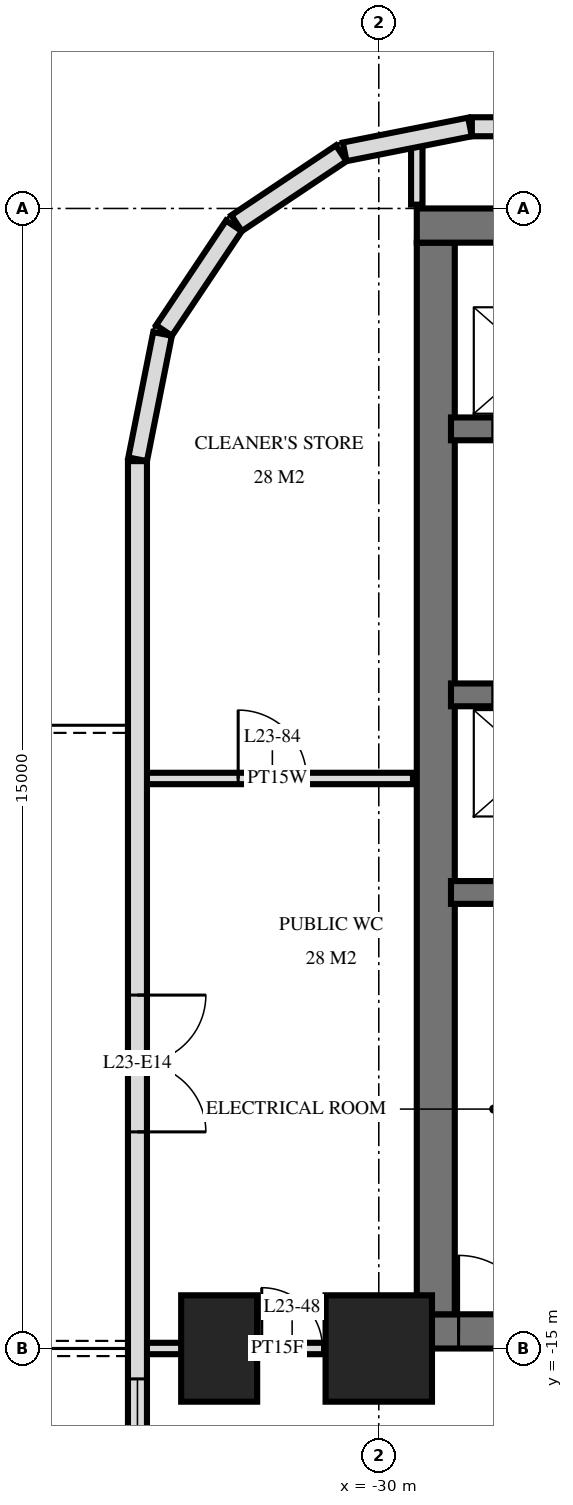
"""IFC4 building model, lengths in metres.
Left out: names, types, materials, properties, quantities, classifications, styles, units other than length and angle.
Written with IfcOpenShell. Run it as: python <this file> out.ifc"""

import sys

from ifc_helpers import new_model, si_unit, direction, frame, frame_2d, origin, origin_2d, place, context, subcontext, project, spatial, rectangle, extrude, element, fill, save


model = new_model("IFC4")
c1 = context("Model", 3, precision=1e-05, world=origin(), true_north=direction((0.0, 1.0)))
c2 = subcontext(c1, "Body", "Model", "MODEL_VIEW")
j1 = project(units=[si_unit("LENGTHUNIT", "METRE"), si_unit("PLANEANGLEUNIT", "RADIAN")], contexts=[c1])
p1 = place(None, origin())
s1 = spatial("IfcSite", under=j1, at=p1, CompositionType="ELEMENT")
p2 = place(p1, origin())
s2 = spatial("IfcBuilding", under=s1, at=p2, CompositionType="ELEMENT")
p3 = place(p2, frame((0.0, 0.0, 92.4)))
s3 = spatial("IfcBuildingStorey", under=s2, at=p3, CompositionType="ELEMENT", Elevation=92.4)
p4 = place(p3, frame((-32.1, -15.0, 0.0), z_axis=(0.0, 0.0, 1.0), x_axis=(0.0, 1.0, 0.0)))
e1 = element("IfcColumn", 1, at=p4, inside=s3, PredefinedType="COLUMN", context=c2, shape_type="SweptSolid", body=[
    extrude(rectangle(XDim=1.4, YDim=1.0, at=origin_2d()), origin(), (0.0, 0.0, 1.0), 3.6),
])
p5 = place(p3, frame((-30.0, -15.0, 0.0), z_axis=(0.0, 0.0, 1.0), x_axis=(1.0, 0.0, 0.0)))
e2 = element("IfcColumn", 2, at=p5, inside=s3, PredefinedType="COLUMN", context=c2, shape_type="SweptSolid", body=[
    extrude(rectangle(XDim=1.4, YDim=1.4, at=origin_2d()), origin(), (0.0, 0.0, 1.0), 3.6),
])
p6 = place(p3, frame((-29.5, -0.225, 0.0), z_axis=(0.0, 0.0, 1.0), x_axis=(1.0, 0.0, 0.0)))
e3 = element("IfcWall", 3, at=p6, inside=s3, PredefinedType="SHEAR", context=c2, shape_type="SweptSolid", body=[
    extrude(rectangle(XDim=19.5, YDim=0.45, at=frame_2d((9.75, 0.0))), origin(), (0.0, 0.0, 1.0), 3.6),
])
p7 = place(p3, frame((-29.5, -14.775, 0.0), z_axis=(0.0, 0.0, 1.0), x_axis=(1.0, 0.0, 0.0)))
e4 = element("IfcWall", 4, at=p7, inside=s3, PredefinedType="SHEAR", context=c2, shape_type="SweptSolid", body=[
    extrude(rectangle(XDim=19.5, YDim=0.45, at=frame_2d((9.75, 0.0))), origin(), (0.0, 0.0, 1.0), 3.6),
])
p8 = place(p7, frame((11.2, 0.0, 0.0)))
e5 = element("IfcOpeningElement", 5, at=p8, cuts=e4, PredefinedType="OPENING", context=c2, shape_type="SweptSolid", body=[
    extrude(rectangle(XDim=1.2, YDim=2.1, at=frame_2d((0.6, 1.05))), frame((0.0, 0.235, 0.0), z_axis=(0.0, -1.0, 0.0), x_axis=(1.0, 0.0, 0.0)), (0.0, 0.0, 1.0), 0.47),
])
p9 = place(p7, frame((14.25, 0.0, 0.0)))
e6 = element("IfcOpeningElement", 6, at=p9, cuts=e4, PredefinedType="OPENING", context=c2, shape_type="SweptSolid", body=[
    extrude(rectangle(XDim=1.1, YDim=2.1, at=frame_2d((0.55, 1.05))), frame((0.0, 0.235, 0.0), z_axis=(0.0, -1.0, 0.0), x_axis=(1.0, 0.0, 0.0)), (0.0, 0.0, 1.0), 0.47),
])
p10 = place(p7, frame((8.5, 0.0, 0.0)))
e7 = element("IfcOpeningElement", 7, at=p10, cuts=e4, PredefinedType="OPENING", context=c2, shape_type="SweptSolid", body=[
    extrude(rectangle(XDim=0.9, YDim=2.1, at=frame_2d((0.45, 1.05))), frame((0.0, 0.235, 0.0), z_axis=(0.0, -1.0, 0.0), x_axis=(1.0, 0.0, 0.0)), (0.0, 0.0, 1.0), 0.47),
])
p11 = place(p7, frame((6.05, 0.0, 0.0)))
e8 = element("IfcOpeningElement", 8, at=p11, cuts=e4, PredefinedType="OPENING", context=c2, shape_type="SweptSolid", body=[
    extrude(rectangle(XDim=1.0, YDim=2.1, at=frame_2d((0.5, 1.05))), frame((0.0, 0.235, 0.0), z_axis=(0.0, -1.0, 0.0), x_axis=(1.0, 0.0, 0.0)), (0.0, 0.0, 1.0), 0.47),
])
p12 = place(p7, frame((3.587, 0.0, 0.0)))
e9 = element("IfcOpeningElement", 9, at=p12, cuts=e4, PredefinedType="OPENING", context=c2, shape_type="SweptSolid", body=[
    extrude(rectangle(XDim=1.0, YDim=2.1, at=frame_2d((0.5, 1.05))), frame((0.0, 0.235, 0.0), z_axis=(0.0, -1.0, 0.0), x_axis=(1.0, 0.0, 0.0)), (0.0, 0.0, 1.0), 0.47),
])
p13 = place(p7, frame((1.85, 0.0, 0.0)))
e10 = element("IfcOpeningElement", 10, at=p13, cuts=e4, PredefinedType="OPENING", context=c2, shape_type="SweptSolid", body=[
    extrude(rectangle(XDim=1.0, YDim=2.1, at=frame_2d((0.5, 1.05))), frame((0.0, 0.235, 0.0), z_axis=(0.0, -1.0, 0.0), x_axis=(1.0, 0.0, 0.0)), (0.0, 0.0, 1.0), 0.47),
])
p14 = place(p7, frame((0.55, 0.0, 0.0)))
e11 = element("IfcOpeningElement", 11, at=p14, cuts=e4, PredefinedType="OPENING", context=c2, shape_type="SweptSolid", body=[
    extrude(rectangle(XDim=1.0, YDim=2.1, at=frame_2d((0.5, 1.05))), frame((0.0, 0.235, 0.0), z_axis=(0.0, -1.0, 0.0), x_axis=(1.0, 0.0, 0.0)), (0.0, 0.0, 1.0), 0.47),
])
p15 = place(p3, frame((-29.25, -14.55, 0.0), z_axis=(0.0, 0.0, 1.0), x_axis=(0.0, 1.0, 0.0)))
e12 = element("IfcWall", 12, at=p15, inside=s3, PredefinedType="SHEAR", context=c2, shape_type="SweptSolid", body=[
    extrude(rectangle(XDim=14.1, YDim=0.5, at=frame_2d((7.05, 0.0))), origin(), (0.0, 0.0, 1.0), 3.6),
])
p16 = place(p3, frame((-29.05, -2.9, 0.0), z_axis=(0.0, 0.0, 1.0), x_axis=(1.0, 0.0, 0.0)))
e13 = element("IfcWall", 13, at=p16, inside=s3, PredefinedType="SHEAR", context=c2, shape_type="SweptSolid", body=[
    extrude(rectangle(XDim=18.7, YDim=0.3, at=frame_2d((9.35, 0.0))), origin(), (0.0, 0.0, 1.0), 3.6),
])
p17 = place(p16, frame((2.95, 0.0, 0.0)))
e14 = element("IfcOpeningElement", 14, at=p17, cuts=e13, PredefinedType="OPENING", context=c2, shape_type="SweptSolid", body=[
    extrude(rectangle(XDim=1.1, YDim=2.1, at=frame_2d((0.55, 1.05))), frame((0.0, 0.16, 0.0), z_axis=(0.0, -1.0, 0.0), x_axis=(1.0, 0.0, 0.0)), (0.0, 0.0, 1.0), 0.32),
])
p18 = place(p16, frame((0.55, 0.0, 0.0)))
e15 = element("IfcOpeningElement", 15, at=p18, cuts=e13, PredefinedType="OPENING", context=c2, shape_type="SweptSolid", body=[
    extrude(rectangle(XDim=1.1, YDim=2.1, at=frame_2d((0.55, 1.05))), frame((0.0, 0.16, 0.0), z_axis=(0.0, -1.0, 0.0), x_axis=(1.0, 0.0, 0.0)), (0.0, 0.0, 1.0), 0.32),
])
p19 = place(p16, frame((10.9, 0.0, 0.0)))
e16 = element("IfcOpeningElement", 16, at=p19, cuts=e13, PredefinedType="OPENING", context=c2, shape_type="SweptSolid", body=[
    extrude(rectangle(XDim=0.9, YDim=2.1, at=frame_2d((0.45, 1.05))), frame((0.0, 0.16, 0.0), z_axis=(0.0, -1.0, 0.0), x_axis=(1.0, 0.0, 0.0)), (0.0, 0.0, 1.0), 0.32),
])
p20 = place(p16, frame((16.85, 0.0, 0.0)))
e17 = element("IfcOpeningElement", 17, at=p20, cuts=e13, PredefinedType="OPENING", context=c2, shape_type="SweptSolid", body=[
    extrude(rectangle(XDim=1.0, YDim=2.1, at=frame_2d((0.5, 1.05))), frame((0.0, 0.16, 0.0), z_axis=(0.0, -1.0, 0.0), x_axis=(1.0, 0.0, 0.0)), (0.0, 0.0, 1.0), 0.32),
])
p21 = place(p16, frame((14.312, 0.0, 0.0)))
e18 = element("IfcOpeningElement", 18, at=p21, cuts=e13, PredefinedType="OPENING", context=c2, shape_type="SweptSolid", body=[
    extrude(rectangle(XDim=1.0, YDim=2.1, at=frame_2d((0.5, 1.05))), frame((0.0, 0.16, 0.0), z_axis=(0.0, -1.0, 0.0), x_axis=(1.0, 0.0, 0.0)), (0.0, 0.0, 1.0), 0.32),
])
p22 = place(p16, frame((12.887, 0.0, 0.0)))
e19 = element("IfcOpeningElement", 19, at=p22, cuts=e13, PredefinedType="OPENING", context=c2, shape_type="SweptSolid", body=[
    extrude(rectangle(XDim=1.0, YDim=2.1, at=frame_2d((0.5, 1.05))), frame((0.0, 0.16, 0.0), z_axis=(0.0, -1.0, 0.0), x_axis=(1.0, 0.0, 0.0)), (0.0, 0.0, 1.0), 0.32),
])
p23 = place(p16, frame((5.6, 0.0, 0.0)))
e20 = element("IfcOpeningElement", 20, at=p23, cuts=e13, PredefinedType="OPENING", context=c2, shape_type="SweptSolid", body=[
    extrude(rectangle(XDim=1.0, YDim=2.1, at=frame_2d((0.5, 1.05))), frame((0.0, 0.16, 0.0), z_axis=(0.0, -1.0, 0.0), x_axis=(1.0, 0.0, 0.0)), (0.0, 0.0, 1.0), 0.32),
])
p24 = place(p3, frame((-29.05, -6.4, 0.0), z_axis=(0.0, 0.0, 1.0), x_axis=(1.0, 0.0, 0.0)))
e21 = element("IfcWall", 21, at=p24, inside=s3, PredefinedType="SHEAR", context=c2, shape_type="SweptSolid", body=[
    extrude(rectangle(XDim=18.7, YDim=0.3, at=frame_2d((9.35, 0.0))), origin(), (0.0, 0.0, 1.0), 3.6),
])
p25 = place(p24, frame((2.95, 0.0, 0.0)))
e22 = element("IfcOpeningElement", 22, at=p25, cuts=e21, PredefinedType="OPENING", context=c2, shape_type="SweptSolid", body=[
    extrude(rectangle(XDim=1.1, YDim=2.1, at=frame_2d((0.55, 1.05))), frame((0.0, 0.16, 0.0), z_axis=(0.0, -1.0, 0.0), x_axis=(1.0, 0.0, 0.0)), (0.0, 0.0, 1.0), 0.32),
])
p26 = place(p24, frame((0.55, 0.0, 0.0)))
e23 = element("IfcOpeningElement", 23, at=p26, cuts=e21, PredefinedType="OPENING", context=c2, shape_type="SweptSolid", body=[
    extrude(rectangle(XDim=1.1, YDim=2.1, at=frame_2d((0.55, 1.05))), frame((0.0, 0.16, 0.0), z_axis=(0.0, -1.0, 0.0), x_axis=(1.0, 0.0, 0.0)), (0.0, 0.0, 1.0), 0.32),
])
p27 = place(p24, frame((10.8, 0.0, 0.0)))
e24 = element("IfcOpeningElement", 24, at=p27, cuts=e21, PredefinedType="OPENING", context=c2, shape_type="SweptSolid", body=[
    extrude(rectangle(XDim=1.1, YDim=2.1, at=frame_2d((0.55, 1.05))), frame((0.0, 0.16, 0.0), z_axis=(0.0, -1.0, 0.0), x_axis=(1.0, 0.0, 0.0)), (0.0, 0.0, 1.0), 0.32),
])
p28 = place(p24, frame((5.6, 0.0, 0.0)))
e25 = element("IfcOpeningElement", 25, at=p28, cuts=e21, PredefinedType="OPENING", context=c2, shape_type="SweptSolid", body=[
    extrude(rectangle(XDim=1.0, YDim=2.1, at=frame_2d((0.5, 1.05))), frame((0.0, 0.16, 0.0), z_axis=(0.0, -1.0, 0.0), x_axis=(1.0, 0.0, 0.0)), (0.0, 0.0, 1.0), 0.32),
])
p29 = place(p3, frame((-29.05, -9.0, 0.0), z_axis=(0.0, 0.0, 1.0), x_axis=(1.0, 0.0, 0.0)))
e26 = element("IfcWall", 26, at=p29, inside=s3, PredefinedType="SHEAR", context=c2, shape_type="SweptSolid", body=[
    extrude(rectangle(XDim=18.7, YDim=0.3, at=frame_2d((9.35, 0.0))), origin(), (0.0, 0.0, 1.0), 3.6),
])
p30 = place(p29, frame((13.8, 0.0, 0.0)))
e27 = element("IfcOpeningElement", 27, at=p30, cuts=e26, PredefinedType="OPENING", context=c2, shape_type="SweptSolid", body=[
    extrude(rectangle(XDim=1.1, YDim=2.1, at=frame_2d((0.55, 1.05))), frame((0.0, 0.16, 0.0), z_axis=(0.0, -1.0, 0.0), x_axis=(1.0, 0.0, 0.0)), (0.0, 0.0, 1.0), 0.32),
])
p31 = place(p3, frame((28.775, 1.075, 0.0), z_axis=(0.0, 0.0, 1.0), x_axis=(-1.0, 0.0, 0.0)))
e28 = element("IfcWall", 28, at=p31, inside=s3, PredefinedType="SOLIDWALL", context=c2, shape_type="SweptSolid", body=[
    extrude(rectangle(XDim=57.551, YDim=0.25, at=frame_2d((28.775, 0.0))), origin(), (0.0, 0.0, 1.0), 3.32),
])
p32 = place(p31, frame((21.275, 0.0, 0.3)))
e29 = element("IfcOpeningElement", 29, at=p32, cuts=e28, PredefinedType="OPENING", context=c2, shape_type="SweptSolid", body=[
    extrude(rectangle(XDim=2.4, YDim=2.1, at=frame_2d((1.2, 1.05))), frame((0.0, 0.135, 0.0), z_axis=(0.0, -1.0, 0.0), x_axis=(1.0, 0.0, 0.0)), (0.0, 0.0, 1.0), 0.27),
])
p33 = place(p31, frame((24.275, 0.0, 0.3)))
e30 = element("IfcOpeningElement", 30, at=p33, cuts=e28, PredefinedType="OPENING", context=c2, shape_type="SweptSolid", body=[
    extrude(rectangle(XDim=2.4, YDim=2.1, at=frame_2d((1.2, 1.05))), frame((0.0, 0.135, 0.0), z_axis=(0.0, -1.0, 0.0), x_axis=(1.0, 0.0, 0.0)), (0.0, 0.0, 1.0), 0.27),
])
p34 = place(p31, frame((30.275, 0.0, 0.3)))
e31 = element("IfcOpeningElement", 31, at=p34, cuts=e28, PredefinedType="OPENING", context=c2, shape_type="SweptSolid", body=[
    extrude(rectangle(XDim=2.4, YDim=2.1, at=frame_2d((1.2, 1.05))), frame((0.0, 0.135, 0.0), z_axis=(0.0, -1.0, 0.0), x_axis=(1.0, 0.0, 0.0)), (0.0, 0.0, 1.0), 0.27),
])
p35 = place(p3, frame((-28.8, 1.073, 0.0), z_axis=(0.0, 0.0, 1.0), x_axis=(-0.980803419081, -0.194999110559, 0.0)))
e32 = element("IfcWall", 32, at=p35, inside=s3, PredefinedType="SOLIDWALL", context=c2, shape_type="SweptSolid", body=[
    extrude(rectangle(XDim=1.681, YDim=0.25, at=frame_2d((0.841, 0.0))), origin(), (0.0, 0.0, 1.0), 3.32),
])
for number, where, z_axis, x_axis in (
    (33, (-30.494, 0.726, 0.0), (0.0, 0.0, 1.0), (-0.831, -0.556, 0.0)),
    (34, (-31.906, -0.229, 0.0), (0.0, 0.0, 1.0), (-0.556, -0.831, 0.0)),
):
    element("IfcWall", number, at=place(p3, frame(where, z_axis=z_axis, x_axis=x_axis)), inside=s3, PredefinedType="SOLIDWALL", context=c2, shape_type="SweptSolid", body=[
        extrude(rectangle(XDim=1.656, YDim=0.25, at=frame_2d((0.828, 0.0))), origin(), (0.0, 0.0, 1.0), 3.32),
    ])
p36 = place(p3, frame((-32.844, -1.651, 0.0), z_axis=(0.0, 0.0, 1.0), x_axis=(-0.19513878023, -0.980775640221, 0.0)))
e35 = element("IfcWall", 35, at=p36, inside=s3, PredefinedType="SOLIDWALL", context=c2, shape_type="SweptSolid", body=[
    extrude(rectangle(XDim=1.681, YDim=0.25, at=frame_2d((0.841, 0.0))), origin(), (0.0, 0.0, 1.0), 3.32),
])
p37 = place(p3, frame((-33.175, -3.325, 0.0), z_axis=(0.0, 0.0, 1.0), x_axis=(0.0, -1.0, 0.0)))
e36 = element("IfcWall", 36, at=p37, inside=s3, PredefinedType="SOLIDWALL", context=c2, shape_type="SweptSolid", body=[
    extrude(rectangle(XDim=21.551, YDim=0.25, at=frame_2d((10.775, 0.0))), origin(), (0.0, 0.0, 1.0), 3.32),
])
p38 = place(p37, frame((7.025, 0.0, 0.0)))
e37 = element("IfcOpeningElement", 37, at=p38, cuts=e36, PredefinedType="OPENING", context=c2, shape_type="SweptSolid", body=[
    extrude(rectangle(XDim=1.8, YDim=2.4, at=frame_2d((0.9, 1.2))), frame((0.0, 0.135, 0.0), z_axis=(0.0, -1.0, 0.0), x_axis=(1.0, 0.0, 0.0)), (0.0, 0.0, 1.0), 0.27),
])
p39 = place(p37, frame((12.075, 0.0, 0.3)))
e38 = element("IfcOpeningElement", 38, at=p39, cuts=e36, PredefinedType="OPENING", context=c2, shape_type="SweptSolid", body=[
    extrude(rectangle(XDim=1.2, YDim=2.1, at=frame_2d((0.6, 1.05))), frame((0.0, 0.135, 0.0), z_axis=(0.0, -1.0, 0.0), x_axis=(1.0, 0.0, 0.0)), (0.0, 0.0, 1.0), 0.27),
])
p40 = place(p37, frame((14.575, 0.0, 0.0)))
e39 = element("IfcOpeningElement", 39, at=p40, cuts=e36, PredefinedType="OPENING", context=c2, shape_type="SweptSolid", body=[
    extrude(rectangle(XDim=1.8, YDim=2.4, at=frame_2d((0.9, 1.2))), frame((0.0, 0.135, 0.0), z_axis=(0.0, -1.0, 0.0), x_axis=(1.0, 0.0, 0.0)), (0.0, 0.0, 1.0), 0.27),
])
p41 = place(p37, frame((18.875, 0.0, 0.0)))
e40 = element("IfcOpeningElement", 40, at=p41, cuts=e36, PredefinedType="OPENING", context=c2, shape_type="SweptSolid", body=[
    extrude(rectangle(XDim=1.8, YDim=2.4, at=frame_2d((0.9, 1.2))), frame((0.0, 0.135, 0.0), z_axis=(0.0, -1.0, 0.0), x_axis=(1.0, 0.0, 0.0)), (0.0, 0.0, 1.0), 0.27),
])
p42 = place(p3, frame((-29.5, 0.05, 0.0), z_axis=(0.0, 0.0, 1.0), x_axis=(0.0, 1.0, 0.0)))
e41 = element("IfcWall", 41, at=p42, inside=s3, PredefinedType="PARTITIONING", context=c2, shape_type="SweptSolid", body=[
    extrude(rectangle(XDim=0.827, YDim=0.15, at=frame_2d((0.414, 0.0))), origin(), (0.0, 0.0, 1.0), 3.32),
])
p43 = place(p3, frame((-33.12, -15.0, 0.0), z_axis=(0.0, 0.0, 1.0), x_axis=(1.0, 0.0, 0.0)))
e42 = element("IfcWall", 42, at=p43, inside=s3, PredefinedType="PARTITIONING", context=c2, shape_type="SweptSolid", body=[
    extrude(rectangle(XDim=3.57, YDim=0.15, at=frame_2d((1.785, 0.0))), origin(), (0.0, 0.0, 1.0), 3.32),
])
p44 = place(p43, frame((1.58, 0.0, 0.0)))
e43 = element("IfcOpeningElement", 43, at=p44, cuts=e42, PredefinedType="OPENING", context=c2, shape_type="SweptSolid", body=[
    extrude(rectangle(XDim=0.8, YDim=2.1, at=frame_2d((0.4, 1.05))), frame((0.0, 0.085, 0.0), z_axis=(0.0, -1.0, 0.0), x_axis=(1.0, 0.0, 0.0)), (0.0, 0.0, 1.0), 0.17),
])
p45 = place(p3, frame((-33.12, -7.5, 0.0), z_axis=(0.0, 0.0, 1.0), x_axis=(1.0, 0.0, 0.0)))
e44 = element("IfcWall", 44, at=p45, inside=s3, PredefinedType="PLUMBINGWALL", context=c2, shape_type="SweptSolid", body=[
    extrude(rectangle(XDim=3.57, YDim=0.15, at=frame_2d((1.785, 0.0))), origin(), (0.0, 0.0, 1.0), 3.32),
])
p46 = place(p45, frame((1.27, 0.0, 0.0)))
e45 = element("IfcOpeningElement", 45, at=p46, cuts=e44, PredefinedType="OPENING", context=c2, shape_type="SweptSolid", body=[
    extrude(rectangle(XDim=0.9, YDim=2.1, at=frame_2d((0.45, 1.05))), frame((0.0, 0.085, 0.0), z_axis=(0.0, -1.0, 0.0), x_axis=(1.0, 0.0, 0.0)), (0.0, 0.0, 1.0), 0.17),
])
p47 = place(p38, origin())
e46 = element("IfcDoor", 46, at=p47, inside=s3, OperationType="DOUBLE_DOOR_SINGLE_SWING", PredefinedType="DOOR", context=c2, shape_type="SweptSolid", body=[
    extrude(rectangle(XDim=1.8, YDim=2.4, at=frame_2d((0.9, 1.2))), frame((0.0, 0.025, 0.0), z_axis=(0.0, -1.0, 0.0), x_axis=(1.0, 0.0, 0.0)), (0.0, 0.0, 1.0), 0.05),
])
fill(e37, e46)
p48 = place(p39, origin())
e47 = element("IfcWindow", 47, at=p48, inside=s3, PartitioningType="SINGLE_PANEL", PredefinedType="WINDOW", context=c2, shape_type="SweptSolid", body=[
    extrude(rectangle(XDim=1.2, YDim=2.1, at=frame_2d((0.6, 1.05))), frame((0.0, 0.03, 0.0), z_axis=(0.0, -1.0, 0.0), x_axis=(1.0, 0.0, 0.0)), (0.0, 0.0, 1.0), 0.06),
])
fill(e38, e47)
p49 = place(p14, origin())
e48 = element("IfcDoor", 48, at=p49, inside=s3, OperationType="SINGLE_SWING_RIGHT", PredefinedType="DOOR", context=c2, shape_type="SweptSolid", body=[
    extrude(rectangle(XDim=1.0, YDim=2.1, at=frame_2d((0.5, 1.05))), frame((0.0, 0.025, 0.0), z_axis=(0.0, -1.0, 0.0), x_axis=(1.0, 0.0, 0.0)), (0.0, 0.0, 1.0), 0.05),
])
fill(e11, e48)
p50 = place(p44, origin())
e49 = element("IfcDoor", 49, at=p50, inside=s3, OperationType="SINGLE_SWING_RIGHT", PredefinedType="DOOR", context=c2, shape_type="SweptSolid", body=[
    extrude(rectangle(XDim=0.8, YDim=2.1, at=frame_2d((0.4, 1.05))), frame((0.0, 0.025, 0.0), z_axis=(0.0, -1.0, 0.0), x_axis=(1.0, 0.0, 0.0)), (0.0, 0.0, 1.0), 0.05),
])
fill(e43, e49)
p51 = place(p46, origin())
e50 = element("IfcDoor", 50, at=p51, inside=s3, OperationType="SINGLE_SWING_RIGHT", PredefinedType="DOOR", context=c2, shape_type="SweptSolid", body=[
    extrude(rectangle(XDim=0.9, YDim=2.1, at=frame_2d((0.45, 1.05))), frame((0.0, 0.025, 0.0), z_axis=(0.0, -1.0, 0.0), x_axis=(1.0, 0.0, 0.0)), (0.0, 0.0, 1.0), 0.05),
])
fill(e45, e50)
save(model, sys.argv[1])
